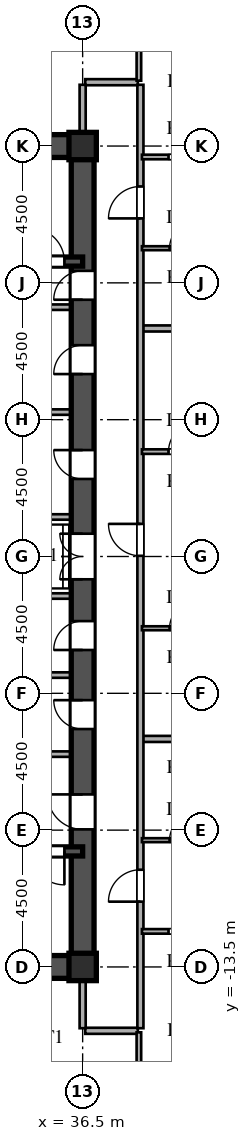
"""IFC4 building model, lengths in metres.
Left out: names, types, materials, properties, quantities, classifications, styles, units other than length and angle.
Written with IfcOpenShell. Run it as: python <this file> out.ifc"""

import sys

from ifc_helpers import new_model, si_unit, direction, frame, frame_2d, origin, origin_2d, place, context, subcontext, project, spatial, rectangle, i_section, extrude, source, transform, mapped, element, fill, save


model = new_model("IFC4")
c1 = context("Model", 3, precision=1e-05, world=origin(), true_north=direction((0.0, 1.0)))
c2 = subcontext(c1, "Body", "Model", "MODEL_VIEW")
j1 = project(units=[si_unit("LENGTHUNIT", "METRE"), si_unit("PLANEANGLEUNIT", "RADIAN")], contexts=[c1])
p1 = place(None, origin())
s1 = spatial("IfcSite", under=j1, at=p1, CompositionType="ELEMENT")
p2 = place(p1, origin())
s2 = spatial("IfcBuilding", under=s1, at=p2, CompositionType="ELEMENT")
p3 = place(p2, frame((0.0, 0.0, 26.1)))
s3 = spatial("IfcBuildingStorey", under=s2, at=p3, CompositionType="ELEMENT", Elevation=26.1)
m1 = source(origin(), c2, "Body", "SweptSolid", [
    extrude(i_section(OverallWidth=0.9, OverallDepth=0.9, WebThickness=0.036, FlangeThickness=0.055, at=origin_2d()), origin(), (0.0, 0.0, 1.0), 3.6),
])
for number, where, z_axis, x_axis in (
    (1, (36.5, -13.5, 0.0), (0.0, 0.0, 1.0), (1.0, 0.0, 0.0)),
    (2, (36.5, 13.5, 0.0), (0.0, 0.0, 1.0), (1.0, 0.0, 0.0)),
):
    element("IfcColumn", number, at=place(p3, frame(where, z_axis=z_axis, x_axis=x_axis)), inside=s3, PredefinedType="COLUMN", context=c2, shape_type="MappedRepresentation", body=[
        mapped(m1, transform((0.0, 0.0, 0.0), scale=1.0)),
    ])
for number, where, z_axis, x_axis in (
    (3, (27.5, -13.5, 0.0), (0.0, 0.0, 1.0), (1.0, 0.0, 0.0)),
    (4, (27.5, 13.5, 0.0), (0.0, 0.0, 1.0), (1.0, 0.0, 0.0)),
):
    element("IfcWall", number, at=place(p3, frame(where, z_axis=z_axis, x_axis=x_axis)), inside=s3, PredefinedType="SHEAR", context=c2, shape_type="SweptSolid", body=[
        extrude(rectangle(XDim=9.0, YDim=0.75, at=frame_2d((4.5, 0.0))), origin(), (0.0, 0.0, 1.0), 3.38),
    ])
p4 = place(p3, frame((36.5, -13.65, 0.0), z_axis=(0.0, 0.0, 1.0), x_axis=(0.0, 1.0, 0.0)))
e5 = element("IfcWall", 5, at=p4, inside=s3, PredefinedType="SHEAR", context=c2, shape_type="SweptSolid", body=[
    extrude(rectangle(XDim=7.15, YDim=0.75, at=frame_2d((3.575, 0.0))), origin(), (0.0, 0.0, 1.0), 3.38),
])
p5 = place(p4, frame((4.675, 0.0, 0.0)))
e6 = element("IfcOpeningElement", 6, at=p5, cuts=e5, PredefinedType="OPENING", context=c2, shape_type="SweptSolid", body=[
    extrude(rectangle(XDim=1.15, YDim=2.2, at=frame_2d((0.575, 1.1))), frame((0.0, 0.385, 0.0), z_axis=(0.0, -1.0, 0.0), x_axis=(1.0, 0.0, 0.0)), (0.0, 0.0, 1.0), 0.77),
])
p6 = place(p3, frame((36.5, -1.3, 0.0), z_axis=(0.0, 0.0, 1.0), x_axis=(0.0, 1.0, 0.0)))
e7 = element("IfcWall", 7, at=p6, inside=s3, PredefinedType="SHEAR", context=c2, shape_type="SweptSolid", body=[
    extrude(rectangle(XDim=2.6, YDim=0.75, at=frame_2d((1.3, 0.0))), origin(), (0.0, 0.0, 1.0), 3.38),
])
p7 = place(p6, frame((0.55, 0.0, 0.0)))
e8 = element("IfcOpeningElement", 8, at=p7, cuts=e7, PredefinedType="OPENING", context=c2, shape_type="SweptSolid", body=[
    extrude(rectangle(XDim=1.5, YDim=2.3, at=frame_2d((0.75, 1.15))), frame((0.0, 0.385, 0.0), z_axis=(0.0, -1.0, 0.0), x_axis=(1.0, 0.0, 0.0)), (0.0, 0.0, 1.0), 0.77),
])
p8 = place(p3, frame((36.5, 8.2, 0.0), z_axis=(0.0, 0.0, 1.0), x_axis=(0.0, 1.0, 0.0)))
e9 = element("IfcWall", 9, at=p8, inside=s3, PredefinedType="SHEAR", context=c2, shape_type="SweptSolid", body=[
    extrude(rectangle(XDim=5.45, YDim=0.75, at=frame_2d((2.725, 0.0))), origin(), (0.0, 0.0, 1.0), 3.38),
])
p9 = place(p8, frame((0.245, 0.0, 0.0)))
e10 = element("IfcOpeningElement", 10, at=p9, cuts=e9, PredefinedType="OPENING", context=c2, shape_type="SweptSolid", body=[
    extrude(rectangle(XDim=0.95, YDim=2.15, at=frame_2d((0.475, 1.075))), frame((0.0, 0.385, 0.0), z_axis=(0.0, -1.0, 0.0), x_axis=(1.0, 0.0, 0.0)), (0.0, 0.0, 1.0), 0.77),
])
p10 = place(p3, frame((36.5, -6.5, 0.0), z_axis=(0.0, 0.0, 1.0), x_axis=(0.0, 1.0, 0.0)))
e11 = element("IfcWall", 11, at=p10, inside=s3, PredefinedType="SHEAR", context=c2, shape_type="SweptSolid", body=[
    extrude(rectangle(XDim=2.6, YDim=0.75, at=frame_2d((1.3, 0.0))), origin(), (0.0, 0.0, 1.0), 3.38),
])
p11 = place(p10, frame((0.825, 0.0, 0.0)))
e12 = element("IfcOpeningElement", 12, at=p11, cuts=e11, PredefinedType="OPENING", context=c2, shape_type="SweptSolid", body=[
    extrude(rectangle(XDim=0.95, YDim=2.15, at=frame_2d((0.475, 1.075))), frame((0.0, 0.385, 0.0), z_axis=(0.0, -1.0, 0.0), x_axis=(1.0, 0.0, 0.0)), (0.0, 0.0, 1.0), 0.77),
])
p12 = place(p3, frame((36.5, -3.9, 0.0), z_axis=(0.0, 0.0, 1.0), x_axis=(0.0, 1.0, 0.0)))
e13 = element("IfcWall", 13, at=p12, inside=s3, PredefinedType="SHEAR", context=c2, shape_type="SweptSolid", body=[
    extrude(rectangle(XDim=2.6, YDim=0.75, at=frame_2d((1.3, 0.0))), origin(), (0.0, 0.0, 1.0), 3.38),
])
p13 = place(p12, frame((0.825, 0.0, 0.0)))
e14 = element("IfcOpeningElement", 14, at=p13, cuts=e13, PredefinedType="OPENING", context=c2, shape_type="SweptSolid", body=[
    extrude(rectangle(XDim=0.95, YDim=2.15, at=frame_2d((0.475, 1.075))), frame((0.0, 0.385, 0.0), z_axis=(0.0, -1.0, 0.0), x_axis=(1.0, 0.0, 0.0)), (0.0, 0.0, 1.0), 0.77),
])
p14 = place(p3, frame((36.5, 1.3, 0.0), z_axis=(0.0, 0.0, 1.0), x_axis=(0.0, 1.0, 0.0)))
e15 = element("IfcWall", 15, at=p14, inside=s3, PredefinedType="SHEAR", context=c2, shape_type="SweptSolid", body=[
    extrude(rectangle(XDim=3.45, YDim=0.75, at=frame_2d((1.725, 0.0))), origin(), (0.0, 0.0, 1.0), 3.38),
])
p15 = place(p14, frame((1.25, 0.0, 0.0)))
e16 = element("IfcOpeningElement", 16, at=p15, cuts=e15, PredefinedType="OPENING", context=c2, shape_type="SweptSolid", body=[
    extrude(rectangle(XDim=0.95, YDim=2.15, at=frame_2d((0.475, 1.075))), frame((0.0, 0.385, 0.0), z_axis=(0.0, -1.0, 0.0), x_axis=(1.0, 0.0, 0.0)), (0.0, 0.0, 1.0), 0.77),
])
p16 = place(p3, frame((36.5, 4.75, 0.0), z_axis=(0.0, 0.0, 1.0), x_axis=(0.0, 1.0, 0.0)))
e17 = element("IfcWall", 17, at=p16, inside=s3, PredefinedType="SHEAR", context=c2, shape_type="SweptSolid", body=[
    extrude(rectangle(XDim=3.45, YDim=0.75, at=frame_2d((1.725, 0.0))), origin(), (0.0, 0.0, 1.0), 3.38),
])
p17 = place(p16, frame((1.25, 0.0, 0.0)))
e18 = element("IfcOpeningElement", 18, at=p17, cuts=e17, PredefinedType="OPENING", context=c2, shape_type="SweptSolid", body=[
    extrude(rectangle(XDim=0.95, YDim=2.15, at=frame_2d((0.475, 1.075))), frame((0.0, 0.385, 0.0), z_axis=(0.0, -1.0, 0.0), x_axis=(1.0, 0.0, 0.0)), (0.0, 0.0, 1.0), 0.77),
])
p18 = place(p3, frame((27.5, -9.7, 0.0), z_axis=(0.0, 0.0, 1.0), x_axis=(1.0, 0.0, 0.0)))
e19 = element("IfcWall", 19, at=p18, inside=s3, PredefinedType="SHEAR", context=c2, shape_type="SweptSolid", body=[
    extrude(rectangle(XDim=9.0, YDim=0.3, at=frame_2d((4.5, 0.0))), origin(), (0.0, 0.0, 1.0), 3.38),
])
p19 = place(p18, frame((7.3, 0.0, 0.0)))
e20 = element("IfcOpeningElement", 20, at=p19, cuts=e19, PredefinedType="OPENING", context=c2, shape_type="SweptSolid", body=[
    extrude(rectangle(XDim=1.1, YDim=2.2, at=frame_2d((0.55, 1.1))), frame((0.0, 0.16, 0.0), z_axis=(0.0, -1.0, 0.0), x_axis=(1.0, 0.0, 0.0)), (0.0, 0.0, 1.0), 0.32),
])
p20 = place(p3, frame((27.5, 9.7, 0.0), z_axis=(0.0, 0.0, 1.0), x_axis=(1.0, 0.0, 0.0)))
e21 = element("IfcWall", 21, at=p20, inside=s3, PredefinedType="SHEAR", context=c2, shape_type="SweptSolid", body=[
    extrude(rectangle(XDim=9.0, YDim=0.3, at=frame_2d((4.5, 0.0))), origin(), (0.0, 0.0, 1.0), 3.38),
])
p21 = place(p20, frame((7.3, 0.0, 0.0)))
e22 = element("IfcOpeningElement", 22, at=p21, cuts=e21, PredefinedType="OPENING", context=c2, shape_type="SweptSolid", body=[
    extrude(rectangle(XDim=1.1, YDim=2.2, at=frame_2d((0.55, 1.1))), frame((0.0, 0.16, 0.0), z_axis=(0.0, -1.0, 0.0), x_axis=(1.0, 0.0, 0.0)), (0.0, 0.0, 1.0), 0.32),
])
for number, where, z_axis, x_axis in (
    (23, (30.45, -6.5, 0.0), (0.0, 0.0, 1.0), (1.0, 0.0, 0.0)),
    (24, (30.45, 8.2, 0.0), (0.0, 0.0, 1.0), (1.0, 0.0, 0.0)),
):
    element("IfcWall", number, at=place(p3, frame(where, z_axis=z_axis, x_axis=x_axis)), inside=s3, PredefinedType="PARTITIONING", context=c2, shape_type="SweptSolid", body=[
        extrude(rectangle(XDim=5.7, YDim=0.18, at=frame_2d((2.85, 0.0))), origin(), (0.0, 0.0, 1.0), 3.38),
    ])
for number, where, z_axis, x_axis in (
    (25, (33.2, -1.3, 0.0), (0.0, 0.0, 1.0), (1.0, 0.0, 0.0)),
    (26, (33.2, 1.3, 0.0), (0.0, 0.0, 1.0), (1.0, 0.0, 0.0)),
    (27, (33.2, -3.9, 0.0), (0.0, 0.0, 1.0), (1.0, 0.0, 0.0)),
    (28, (33.2, 4.75, 0.0), (0.0, 0.0, 1.0), (1.0, 0.0, 0.0)),
):
    element("IfcWall", number, at=place(p3, frame(where, z_axis=z_axis, x_axis=x_axis)), inside=s3, PredefinedType="PARTITIONING", context=c2, shape_type="SweptSolid", body=[
        extrude(rectangle(XDim=2.95, YDim=0.18, at=frame_2d((1.475, 0.0))), origin(), (0.0, 0.0, 1.0), 3.38),
    ])
p22 = place(p3, frame((36.585, -15.6, 0.0), z_axis=(0.0, 0.0, 1.0), x_axis=(1.0, 0.0, 0.0)))
e29 = element("IfcWall", 29, at=p22, inside=s3, PredefinedType="PARTITIONING", context=c2, shape_type="SweptSolid", body=[
    extrude(rectangle(XDim=1.73, YDim=0.2, at=frame_2d((0.865, 0.0))), origin(), (0.0, 0.0, 1.0), 3.38),
])
p23 = place(p3, frame((38.45, -12.33, 0.0), z_axis=(0.0, 0.0, 1.0), x_axis=(1.0, 0.0, 0.0)))
e30 = element("IfcWall", 30, at=p23, inside=s3, PredefinedType="PARTITIONING", context=c2, shape_type="SweptSolid", body=[
    extrude(rectangle(XDim=2.7, YDim=0.15, at=frame_2d((1.35, 0.0))), origin(), (0.0, 0.0, 1.0), 3.38),
])
p24 = place(p23, frame((0.875, 0.0, 0.0)))
e31 = element("IfcOpeningElement", 31, at=p24, cuts=e30, PredefinedType="OPENING", context=c2, shape_type="SweptSolid", body=[
    extrude(rectangle(XDim=0.95, YDim=2.15, at=frame_2d((0.475, 1.075))), frame((0.0, 0.085, 0.0), z_axis=(0.0, -1.0, 0.0), x_axis=(1.0, 0.0, 0.0)), (0.0, 0.0, 1.0), 0.17),
])
p25 = place(p3, frame((38.45, -9.33, 0.0), z_axis=(0.0, 0.0, 1.0), x_axis=(1.0, 0.0, 0.0)))
e32 = element("IfcWall", 32, at=p25, inside=s3, PredefinedType="PARTITIONING", context=c2, shape_type="SweptSolid", body=[
    extrude(rectangle(XDim=2.7, YDim=0.13, at=frame_2d((1.35, 0.0))), origin(), (0.0, 0.0, 1.0), 3.38),
])
p26 = place(p25, frame((0.91, 0.0, 0.0)))
e33 = element("IfcOpeningElement", 33, at=p26, cuts=e32, PredefinedType="OPENING", context=c2, shape_type="SweptSolid", body=[
    extrude(rectangle(XDim=0.88, YDim=2.1, at=frame_2d((0.44, 1.05))), frame((0.0, 0.075, 0.0), z_axis=(0.0, -1.0, 0.0), x_axis=(1.0, 0.0, 0.0)), (0.0, 0.0, 1.0), 0.15),
])
p27 = place(p3, frame((38.48, -6.0, 0.0), z_axis=(0.0, 0.0, 1.0), x_axis=(1.0, 0.0, 0.0)))
e34 = element("IfcWall", 34, at=p27, inside=s3, PredefinedType="PARTITIONING", context=c2, shape_type="SweptSolid", body=[
    extrude(rectangle(XDim=34.025, YDim=0.2, at=frame_2d((17.012, 0.0))), origin(), (0.0, 0.0, 1.0), 3.38),
])
p28 = place(p3, frame((38.45, -2.36, 0.0), z_axis=(0.0, 0.0, 1.0), x_axis=(1.0, 0.0, 0.0)))
e35 = element("IfcWall", 35, at=p28, inside=s3, PredefinedType="PARTITIONING", context=c2, shape_type="SweptSolid", body=[
    extrude(rectangle(XDim=2.7, YDim=0.13, at=frame_2d((1.35, 0.0))), origin(), (0.0, 0.0, 1.0), 3.38),
])
p29 = place(p28, frame((0.91, 0.0, 0.0)))
e36 = element("IfcOpeningElement", 36, at=p29, cuts=e35, PredefinedType="OPENING", context=c2, shape_type="SweptSolid", body=[
    extrude(rectangle(XDim=0.88, YDim=2.1, at=frame_2d((0.44, 1.05))), frame((0.0, 0.075, 0.0), z_axis=(0.0, -1.0, 0.0), x_axis=(1.0, 0.0, 0.0)), (0.0, 0.0, 1.0), 0.15),
])
p30 = place(p3, frame((38.45, 3.45, 0.0), z_axis=(0.0, 0.0, 1.0), x_axis=(1.0, 0.0, 0.0)))
e37 = element("IfcWall", 37, at=p30, inside=s3, PredefinedType="PARTITIONING", context=c2, shape_type="SweptSolid", body=[
    extrude(rectangle(XDim=2.7, YDim=0.15, at=frame_2d((1.35, 0.0))), origin(), (0.0, 0.0, 1.0), 3.38),
])
p31 = place(p30, frame((0.875, 0.0, 0.0)))
e38 = element("IfcOpeningElement", 38, at=p31, cuts=e37, PredefinedType="OPENING", context=c2, shape_type="SweptSolid", body=[
    extrude(rectangle(XDim=0.95, YDim=2.15, at=frame_2d((0.475, 1.075))), frame((0.0, 0.085, 0.0), z_axis=(0.0, -1.0, 0.0), x_axis=(1.0, 0.0, 0.0)), (0.0, 0.0, 1.0), 0.17),
])
p32 = place(p3, frame((38.48, 7.5, 0.0), z_axis=(0.0, 0.0, 1.0), x_axis=(1.0, 0.0, 0.0)))
e39 = element("IfcWall", 39, at=p32, inside=s3, PredefinedType="PARTITIONING", context=c2, shape_type="SweptSolid", body=[
    extrude(rectangle(XDim=34.025, YDim=0.2, at=frame_2d((17.012, 0.0))), origin(), (0.0, 0.0, 1.0), 3.38),
])
p33 = place(p3, frame((38.45, 10.14, 0.0), z_axis=(0.0, 0.0, 1.0), x_axis=(1.0, 0.0, 0.0)))
e40 = element("IfcWall", 40, at=p33, inside=s3, PredefinedType="PARTITIONING", context=c2, shape_type="SweptSolid", body=[
    extrude(rectangle(XDim=2.7, YDim=0.13, at=frame_2d((1.35, 0.0))), origin(), (0.0, 0.0, 1.0), 3.38),
])
p34 = place(p33, frame((0.91, 0.0, 0.0)))
e41 = element("IfcOpeningElement", 41, at=p34, cuts=e40, PredefinedType="OPENING", context=c2, shape_type="SweptSolid", body=[
    extrude(rectangle(XDim=0.88, YDim=2.1, at=frame_2d((0.44, 1.05))), frame((0.0, 0.075, 0.0), z_axis=(0.0, -1.0, 0.0), x_axis=(1.0, 0.0, 0.0)), (0.0, 0.0, 1.0), 0.15),
])
p35 = place(p3, frame((38.45, 13.14, 0.0), z_axis=(0.0, 0.0, 1.0), x_axis=(1.0, 0.0, 0.0)))
e42 = element("IfcWall", 42, at=p35, inside=s3, PredefinedType="PARTITIONING", context=c2, shape_type="SweptSolid", body=[
    extrude(rectangle(XDim=2.7, YDim=0.15, at=frame_2d((1.35, 0.0))), origin(), (0.0, 0.0, 1.0), 3.38),
])
p36 = place(p35, frame((0.875, 0.0, 0.0)))
e43 = element("IfcOpeningElement", 43, at=p36, cuts=e42, PredefinedType="OPENING", context=c2, shape_type="SweptSolid", body=[
    extrude(rectangle(XDim=0.95, YDim=2.15, at=frame_2d((0.475, 1.075))), frame((0.0, 0.085, 0.0), z_axis=(0.0, -1.0, 0.0), x_axis=(1.0, 0.0, 0.0)), (0.0, 0.0, 1.0), 0.17),
])
p37 = place(p3, frame((36.585, 15.6, 0.0), z_axis=(0.0, 0.0, 1.0), x_axis=(1.0, 0.0, 0.0)))
e44 = element("IfcWall", 44, at=p37, inside=s3, PredefinedType="PARTITIONING", context=c2, shape_type="SweptSolid", body=[
    extrude(rectangle(XDim=1.73, YDim=0.2, at=frame_2d((0.865, 0.0))), origin(), (0.0, 0.0, 1.0), 3.38),
])
for number, where, z_axis, x_axis in (
    (45, (36.5, -15.515, 0.0), (0.0, 0.0, 1.0), (0.0, 1.0, 0.0)),
    (46, (36.5, 13.88, 0.0), (0.0, 0.0, 1.0), (0.0, 1.0, 0.0)),
):
    element("IfcWall", number, at=place(p3, frame(where, z_axis=z_axis, x_axis=x_axis)), inside=s3, PredefinedType="PARTITIONING", context=c2, shape_type="SweptSolid", body=[
        extrude(rectangle(XDim=1.635, YDim=0.2, at=frame_2d((0.817, 0.0))), origin(), (0.0, 0.0, 1.0), 2.68),
    ])
p38 = place(p3, frame((38.35, -23.858, 0.0), z_axis=(0.0, 0.0, 1.0), x_axis=(0.0, 1.0, 0.0)))
e47 = element("IfcWall", 47, at=p38, inside=s3, PredefinedType="PARTITIONING", context=c2, shape_type="SweptSolid", body=[
    extrude(rectangle(XDim=8.208, YDim=0.15, at=frame_2d((4.104, 0.0))), origin(), (0.0, 0.0, 1.0), 3.38),
])
p39 = place(p38, frame((1.347, 0.0, 0.0)))
e48 = element("IfcOpeningElement", 48, at=p39, cuts=e47, PredefinedType="OPENING", context=c2, shape_type="SweptSolid", body=[
    extrude(rectangle(XDim=0.95, YDim=2.15, at=frame_2d((0.475, 1.075))), frame((0.0, 0.085, 0.0), z_axis=(0.0, -1.0, 0.0), x_axis=(1.0, 0.0, 0.0)), (0.0, 0.0, 1.0), 0.17),
])
p40 = place(p38, frame((5.458, 0.0, 0.0)))
e49 = element("IfcOpeningElement", 49, at=p40, cuts=e47, PredefinedType="OPENING", context=c2, shape_type="SweptSolid", body=[
    extrude(rectangle(XDim=0.95, YDim=2.15, at=frame_2d((0.475, 1.075))), frame((0.0, 0.085, 0.0), z_axis=(0.0, -1.0, 0.0), x_axis=(1.0, 0.0, 0.0)), (0.0, 0.0, 1.0), 0.17),
])
p41 = place(p3, frame((38.35, 15.65, 0.0), z_axis=(0.0, 0.0, 1.0), x_axis=(0.0, 1.0, 0.0)))
e50 = element("IfcWall", 50, at=p41, inside=s3, PredefinedType="PARTITIONING", context=c2, shape_type="SweptSolid", body=[
    extrude(rectangle(XDim=8.208, YDim=0.15, at=frame_2d((4.104, 0.0))), origin(), (0.0, 0.0, 1.0), 3.38),
])
p42 = place(p41, frame((1.8, 0.0, 0.0)))
e51 = element("IfcOpeningElement", 51, at=p42, cuts=e50, PredefinedType="OPENING", context=c2, shape_type="SweptSolid", body=[
    extrude(rectangle(XDim=0.95, YDim=2.15, at=frame_2d((0.475, 1.075))), frame((0.0, 0.085, 0.0), z_axis=(0.0, -1.0, 0.0), x_axis=(1.0, 0.0, 0.0)), (0.0, 0.0, 1.0), 0.17),
])
p43 = place(p3, frame((38.4, -15.515, 0.0), z_axis=(0.0, 0.0, 1.0), x_axis=(0.0, 1.0, 0.0)))
e52 = element("IfcWall", 52, at=p43, inside=s3, PredefinedType="PARTITIONING", context=c2, shape_type="SweptSolid", body=[
    extrude(rectangle(XDim=31.03, YDim=0.2, at=frame_2d((15.515, 0.0))), origin(), (0.0, 0.0, 1.0), 3.38),
])
p44 = place(p43, frame((4.163, 0.0, 0.0)))
e53 = element("IfcOpeningElement", 53, at=p44, cuts=e52, PredefinedType="OPENING", context=c2, shape_type="SweptSolid", body=[
    extrude(rectangle(XDim=1.05, YDim=2.25, at=frame_2d((0.525, 1.125))), frame((0.0, 0.11, 0.0), z_axis=(0.0, -1.0, 0.0), x_axis=(1.0, 0.0, 0.0)), (0.0, 0.0, 1.0), 0.22),
])
p45 = place(p43, frame((15.538, 0.0, 0.0)))
e54 = element("IfcOpeningElement", 54, at=p45, cuts=e52, PredefinedType="OPENING", context=c2, shape_type="SweptSolid", body=[
    extrude(rectangle(XDim=1.05, YDim=2.25, at=frame_2d((0.525, 1.125))), frame((0.0, 0.11, 0.0), z_axis=(0.0, -1.0, 0.0), x_axis=(1.0, 0.0, 0.0)), (0.0, 0.0, 1.0), 0.22),
])
p46 = place(p43, frame((26.635, 0.0, 0.0)))
e55 = element("IfcOpeningElement", 55, at=p46, cuts=e52, PredefinedType="OPENING", context=c2, shape_type="SweptSolid", body=[
    extrude(rectangle(XDim=1.05, YDim=2.25, at=frame_2d((0.525, 1.125))), frame((0.0, 0.11, 0.0), z_axis=(0.0, -1.0, 0.0), x_axis=(1.0, 0.0, 0.0)), (0.0, 0.0, 1.0), 0.22),
])
m2 = source(origin(), c2, "Body", "SweptSolid", [
    extrude(rectangle(XDim=1.15, YDim=2.2, at=frame_2d((0.575, 1.1))), frame((0.0, 0.025, 0.0), z_axis=(0.0, -1.0, 0.0), x_axis=(1.0, 0.0, 0.0)), (0.0, 0.0, 1.0), 0.05),
])
p47 = place(p5, origin())
e56 = element("IfcDoor", 56, at=p47, inside=s3, OperationType="SINGLE_SWING_RIGHT", PredefinedType="DOOR", context=c2, shape_type="MappedRepresentation", body=[
    mapped(m2, transform((0.0, 0.0, 0.0), scale=1.0)),
])
fill(e6, e56)
m3 = source(origin(), c2, "Body", "SweptSolid", [
    extrude(rectangle(XDim=1.5, YDim=2.3, at=frame_2d((0.75, 1.15))), frame((0.0, 0.025, 0.0), z_axis=(0.0, -1.0, 0.0), x_axis=(1.0, 0.0, 0.0)), (0.0, 0.0, 1.0), 0.05),
])
p48 = place(p7, origin())
e57 = element("IfcDoor", 57, at=p48, inside=s3, OperationType="DOUBLE_SWING_LEFT", PredefinedType="DOOR", context=c2, shape_type="MappedRepresentation", body=[
    mapped(m3, transform((0.0, 0.0, 0.0), scale=1.0)),
])
fill(e8, e57)
m4 = source(origin(), c2, "Body", "SweptSolid", [
    extrude(rectangle(XDim=0.95, YDim=2.15, at=frame_2d((0.475, 1.075))), frame((0.0, 0.025, 0.0), z_axis=(0.0, -1.0, 0.0), x_axis=(1.0, 0.0, 0.0)), (0.0, 0.0, 1.0), 0.05),
])
p49 = place(p9, origin())
e58 = element("IfcDoor", 58, at=p49, inside=s3, OperationType="SINGLE_SWING_LEFT", PredefinedType="DOOR", context=c2, shape_type="MappedRepresentation", body=[
    mapped(m4, transform((0.0, 0.0, 0.0), scale=1.0)),
])
fill(e10, e58)
p50 = place(p11, origin())
e59 = element("IfcDoor", 59, at=p50, inside=s3, OperationType="SINGLE_SWING_RIGHT", PredefinedType="DOOR", context=c2, shape_type="MappedRepresentation", body=[
    mapped(m4, transform((0.0, 0.0, 0.0), scale=1.0)),
])
fill(e12, e59)
p51 = place(p13, origin())
e60 = element("IfcDoor", 60, at=p51, inside=s3, OperationType="SINGLE_SWING_LEFT", PredefinedType="DOOR", context=c2, shape_type="MappedRepresentation", body=[
    mapped(m4, transform((0.0, 0.0, 0.0), scale=1.0)),
])
fill(e14, e60)
p52 = place(p15, origin())
e61 = element("IfcDoor", 61, at=p52, inside=s3, OperationType="SINGLE_SWING_RIGHT", PredefinedType="DOOR", context=c2, shape_type="MappedRepresentation", body=[
    mapped(m4, transform((0.0, 0.0, 0.0), scale=1.0)),
])
fill(e16, e61)
p53 = place(p17, origin())
e62 = element("IfcDoor", 62, at=p53, inside=s3, OperationType="SINGLE_SWING_LEFT", PredefinedType="DOOR", context=c2, shape_type="MappedRepresentation", body=[
    mapped(m4, transform((0.0, 0.0, 0.0), scale=1.0)),
])
fill(e18, e62)
m5 = source(origin(), c2, "Body", "SweptSolid", [
    extrude(rectangle(XDim=1.1, YDim=2.2, at=frame_2d((0.55, 1.1))), frame((0.0, 0.025, 0.0), z_axis=(0.0, -1.0, 0.0), x_axis=(1.0, 0.0, 0.0)), (0.0, 0.0, 1.0), 0.05),
])
p54 = place(p19, frame((1.1, 0.0, 0.0), z_axis=(0.0, 0.0, 1.0), x_axis=(-1.0, 0.0, 0.0)))
e63 = element("IfcDoor", 63, at=p54, inside=s3, OperationType="SINGLE_SWING_RIGHT", PredefinedType="DOOR", context=c2, shape_type="MappedRepresentation", body=[
    mapped(m5, transform((0.0, 0.0, 0.0), scale=1.0)),
])
fill(e20, e63)
p55 = place(p21, origin())
e64 = element("IfcDoor", 64, at=p55, inside=s3, OperationType="SINGLE_SWING_LEFT", PredefinedType="DOOR", context=c2, shape_type="MappedRepresentation", body=[
    mapped(m5, transform((0.0, 0.0, 0.0), scale=1.0)),
])
fill(e22, e64)
m6 = source(origin(), c2, "Body", "SweptSolid", [
    extrude(rectangle(XDim=0.88, YDim=2.1, at=frame_2d((0.44, 1.05))), frame((0.0, 0.025, 0.0), z_axis=(0.0, -1.0, 0.0), x_axis=(1.0, 0.0, 0.0)), (0.0, 0.0, 1.0), 0.05),
])
p56 = place(p26, origin())
e65 = element("IfcDoor", 65, at=p56, inside=s3, OperationType="SINGLE_SWING_RIGHT", PredefinedType="DOOR", context=c2, shape_type="MappedRepresentation", body=[
    mapped(m6, transform((0.0, 0.0, 0.0), scale=1.0)),
])
fill(e33, e65)
p57 = place(p29, origin())
e66 = element("IfcDoor", 66, at=p57, inside=s3, OperationType="SINGLE_SWING_RIGHT", PredefinedType="DOOR", context=c2, shape_type="MappedRepresentation", body=[
    mapped(m6, transform((0.0, 0.0, 0.0), scale=1.0)),
])
fill(e36, e66)
m7 = source(origin(), c2, "Body", "SweptSolid", [
    extrude(rectangle(XDim=0.95, YDim=2.15, at=frame_2d((0.475, 1.075))), frame((0.0, 0.025, 0.0), z_axis=(0.0, -1.0, 0.0), x_axis=(1.0, 0.0, 0.0)), (0.0, 0.0, 1.0), 0.05),
])
p58 = place(p31, origin())
e67 = element("IfcDoor", 67, at=p58, inside=s3, OperationType="SINGLE_SWING_RIGHT", PredefinedType="DOOR", context=c2, shape_type="MappedRepresentation", body=[
    mapped(m7, transform((0.0, 0.0, 0.0), scale=1.0)),
])
fill(e38, e67)
p59 = place(p34, origin())
e68 = element("IfcDoor", 68, at=p59, inside=s3, OperationType="SINGLE_SWING_RIGHT", PredefinedType="DOOR", context=c2, shape_type="MappedRepresentation", body=[
    mapped(m6, transform((0.0, 0.0, 0.0), scale=1.0)),
])
fill(e41, e68)
m8 = source(origin(), c2, "Body", "SweptSolid", [
    extrude(rectangle(XDim=1.05, YDim=2.25, at=frame_2d((0.525, 1.125))), frame((0.0, 0.025, 0.0), z_axis=(0.0, -1.0, 0.0), x_axis=(1.0, 0.0, 0.0)), (0.0, 0.0, 1.0), 0.05),
])
p60 = place(p44, origin())
e69 = element("IfcDoor", 69, at=p60, inside=s3, OperationType="SINGLE_SWING_LEFT", PredefinedType="DOOR", context=c2, shape_type="MappedRepresentation", body=[
    mapped(m8, transform((0.0, 0.0, 0.0), scale=1.0)),
])
fill(e53, e69)
p61 = place(p45, origin())
e70 = element("IfcDoor", 70, at=p61, inside=s3, OperationType="SINGLE_SWING_RIGHT", PredefinedType="DOOR", context=c2, shape_type="MappedRepresentation", body=[
    mapped(m8, transform((0.0, 0.0, 0.0), scale=1.0)),
])
fill(e54, e70)
p62 = place(p46, origin())
e71 = element("IfcDoor", 71, at=p62, inside=s3, OperationType="SINGLE_SWING_LEFT", PredefinedType="DOOR", context=c2, shape_type="MappedRepresentation", body=[
    mapped(m8, transform((0.0, 0.0, 0.0), scale=1.0)),
])
fill(e55, e71)
save(model, sys.argv[1])
